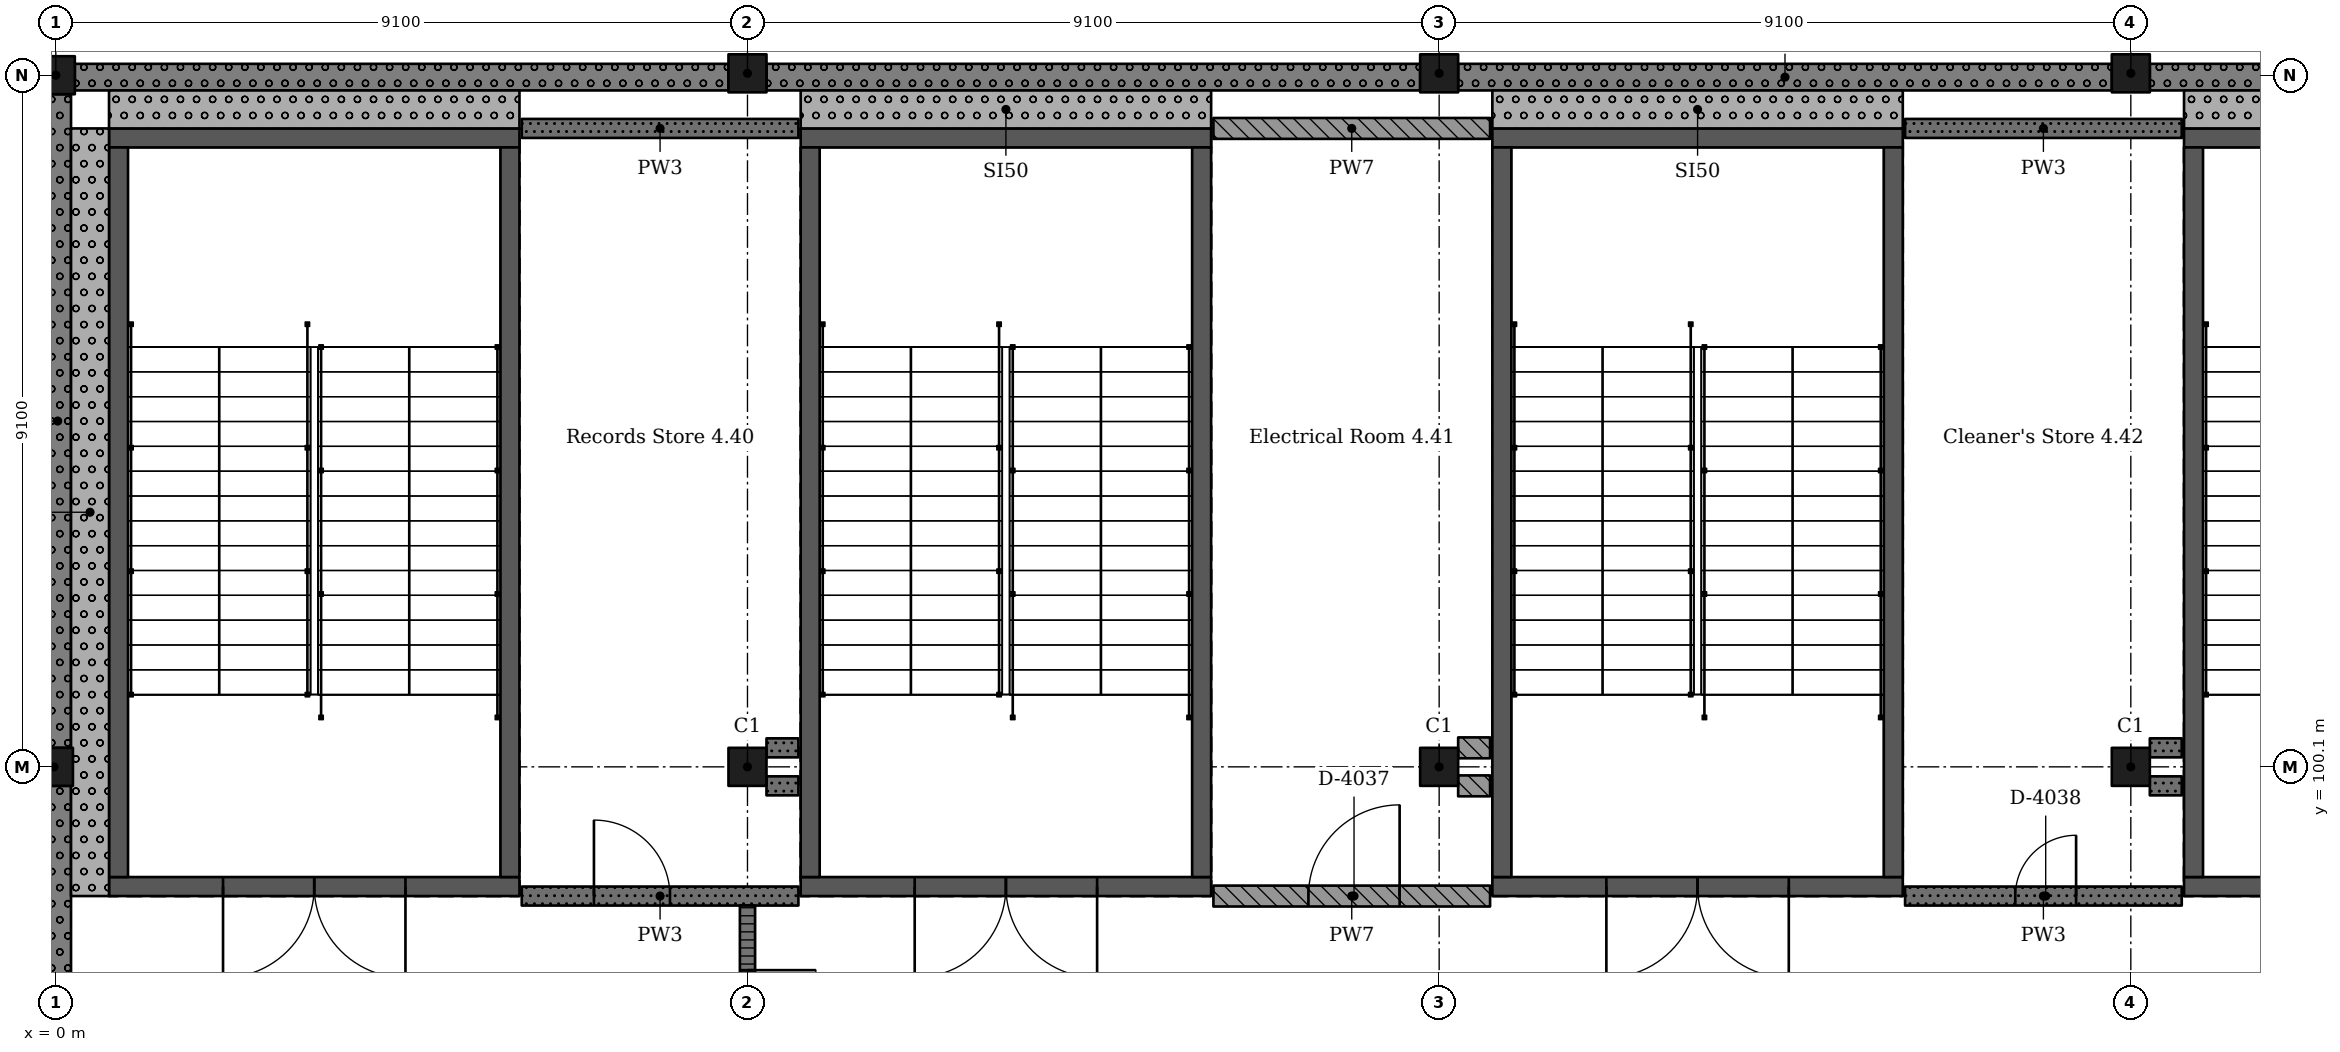
"""IFC4 building model, lengths in metres.
Left out: names, types, materials, properties, quantities, classifications, styles, units other than length and angle.
Written with IfcOpenShell. Run it as: python <this file> out.ifc"""

import sys

from ifc_helpers import new_model, si_unit, direction, frame, frame_2d, origin, origin_2d, place, context, subcontext, project, spatial, rectangle, extrude, element, fill, save


model = new_model("IFC4")
c1 = context("Model", 3, precision=1e-05, world=origin(), true_north=direction((0.0, 1.0)))
c2 = subcontext(c1, "Body", "Model", "MODEL_VIEW")
j1 = project(units=[si_unit("LENGTHUNIT", "METRE"), si_unit("PLANEANGLEUNIT", "RADIAN")], contexts=[c1])
p1 = place(None, origin())
s1 = spatial("IfcSite", under=j1, at=p1, CompositionType="ELEMENT")
p2 = place(p1, origin())
s2 = spatial("IfcBuilding", under=s1, at=p2, CompositionType="ELEMENT")
p3 = place(p2, frame((0.0, 0.0, 20.02)))
s3 = spatial("IfcBuildingStorey", under=s2, at=p3, CompositionType="ELEMENT", Elevation=20.02)
for number, where, z_axis, x_axis in (
    (1, (-0.025, 100.1, 0.0), (0.0, 0.0, 1.0), (1.0, 0.0, 0.0)),
    (2, (0.0, 109.2, 0.0), (0.0, 0.0, 1.0), (1.0, 0.0, 0.0)),
    (3, (9.1, 100.1, 0.0), (0.0, 0.0, 1.0), (1.0, 0.0, 0.0)),
    (4, (9.1, 109.225, 0.0), (0.0, 0.0, 1.0), (1.0, 0.0, 0.0)),
    (5, (18.2, 100.1, 0.0), (0.0, 0.0, 1.0), (1.0, 0.0, 0.0)),
    (6, (18.2, 109.225, 0.0), (0.0, 0.0, 1.0), (1.0, 0.0, 0.0)),
    (7, (27.3, 100.1, 0.0), (0.0, 0.0, 1.0), (1.0, 0.0, 0.0)),
    (8, (27.3, 109.225, 0.0), (0.0, 0.0, 1.0), (1.0, 0.0, 0.0)),
):
    element("IfcColumn", number, at=place(p3, frame(where, z_axis=z_axis, x_axis=x_axis)), inside=s3, PredefinedType="COLUMN", context=c2, shape_type="SweptSolid", body=[
        extrude(rectangle(XDim=0.5, YDim=0.5, at=origin_2d()), origin(), (0.0, 0.0, 1.0), 4.55),
    ])
p4 = place(p3, frame((6.1, 98.525, 0.0), z_axis=(0.0, 0.0, 1.0), x_axis=(-1.0, 0.0, 0.0)))
e9 = element("IfcWall", 9, at=p4, inside=s3, PredefinedType="SHEAR", context=c2, shape_type="SweptSolid", body=[
    extrude(rectangle(XDim=5.4, YDim=0.25, at=frame_2d((2.7, 0.0))), origin(), (0.0, 0.0, 1.0), 4.55),
])
p5 = place(p4, frame((1.5, 0.0, 0.0)))
e10 = element("IfcOpeningElement", 10, at=p5, cuts=e9, PredefinedType="OPENING", context=c2, shape_type="SweptSolid", body=[
    extrude(rectangle(XDim=2.4, YDim=2.1, at=frame_2d((1.2, 1.05))), frame((0.0, 0.135, 0.0), z_axis=(0.0, -1.0, 0.0), x_axis=(1.0, 0.0, 0.0)), (0.0, 0.0, 1.0), 0.27),
])
p6 = place(p3, frame((6.1, 108.375, 0.0), z_axis=(0.0, 0.0, 1.0), x_axis=(-1.0, 0.0, 0.0)))
e11 = element("IfcWall", 11, at=p6, inside=s3, PredefinedType="SHEAR", context=c2, shape_type="SweptSolid", body=[
    extrude(rectangle(XDim=5.4, YDim=0.25, at=frame_2d((2.7, 0.0))), origin(), (0.0, 0.0, 1.0), 4.55),
])
for number, where, z_axis, x_axis in (
    (12, (0.825, 108.25, 0.0), (0.0, 0.0, 1.0), (0.0, -1.0, 0.0)),
    (13, (5.975, 108.25, 0.0), (0.0, 0.0, 1.0), (0.0, -1.0, 0.0)),
):
    element("IfcWall", number, at=place(p3, frame(where, z_axis=z_axis, x_axis=x_axis)), inside=s3, PredefinedType="SHEAR", context=c2, shape_type="SweptSolid", body=[
        extrude(rectangle(XDim=9.6, YDim=0.25, at=frame_2d((4.8, 0.0))), origin(), (0.0, 0.0, 1.0), 4.55),
    ])
p7 = place(p3, frame((15.2, 98.525, 0.0), z_axis=(0.0, 0.0, 1.0), x_axis=(-1.0, 0.0, 0.0)))
e14 = element("IfcWall", 14, at=p7, inside=s3, PredefinedType="SHEAR", context=c2, shape_type="SweptSolid", body=[
    extrude(rectangle(XDim=5.4, YDim=0.25, at=frame_2d((2.7, 0.0))), origin(), (0.0, 0.0, 1.0), 4.55),
])
p8 = place(p7, frame((1.5, 0.0, 0.0)))
e15 = element("IfcOpeningElement", 15, at=p8, cuts=e14, PredefinedType="OPENING", context=c2, shape_type="SweptSolid", body=[
    extrude(rectangle(XDim=2.4, YDim=2.1, at=frame_2d((1.2, 1.05))), frame((0.0, 0.135, 0.0), z_axis=(0.0, -1.0, 0.0), x_axis=(1.0, 0.0, 0.0)), (0.0, 0.0, 1.0), 0.27),
])
p9 = place(p3, frame((15.2, 108.375, 0.0), z_axis=(0.0, 0.0, 1.0), x_axis=(-1.0, 0.0, 0.0)))
e16 = element("IfcWall", 16, at=p9, inside=s3, PredefinedType="SHEAR", context=c2, shape_type="SweptSolid", body=[
    extrude(rectangle(XDim=5.4, YDim=0.25, at=frame_2d((2.7, 0.0))), origin(), (0.0, 0.0, 1.0), 4.55),
])
for number, where, z_axis, x_axis in (
    (17, (9.925, 108.25, 0.0), (0.0, 0.0, 1.0), (0.0, -1.0, 0.0)),
    (18, (15.075, 108.25, 0.0), (0.0, 0.0, 1.0), (0.0, -1.0, 0.0)),
):
    element("IfcWall", number, at=place(p3, frame(where, z_axis=z_axis, x_axis=x_axis)), inside=s3, PredefinedType="SHEAR", context=c2, shape_type="SweptSolid", body=[
        extrude(rectangle(XDim=9.6, YDim=0.25, at=frame_2d((4.8, 0.0))), origin(), (0.0, 0.0, 1.0), 4.55),
    ])
p10 = place(p3, frame((24.3, 98.525, 0.0), z_axis=(0.0, 0.0, 1.0), x_axis=(-1.0, 0.0, 0.0)))
e19 = element("IfcWall", 19, at=p10, inside=s3, PredefinedType="SHEAR", context=c2, shape_type="SweptSolid", body=[
    extrude(rectangle(XDim=5.4, YDim=0.25, at=frame_2d((2.7, 0.0))), origin(), (0.0, 0.0, 1.0), 4.55),
])
p11 = place(p10, frame((1.5, 0.0, 0.0)))
e20 = element("IfcOpeningElement", 20, at=p11, cuts=e19, PredefinedType="OPENING", context=c2, shape_type="SweptSolid", body=[
    extrude(rectangle(XDim=2.4, YDim=2.1, at=frame_2d((1.2, 1.05))), frame((0.0, 0.135, 0.0), z_axis=(0.0, -1.0, 0.0), x_axis=(1.0, 0.0, 0.0)), (0.0, 0.0, 1.0), 0.27),
])
p12 = place(p3, frame((24.3, 108.375, 0.0), z_axis=(0.0, 0.0, 1.0), x_axis=(-1.0, 0.0, 0.0)))
e21 = element("IfcWall", 21, at=p12, inside=s3, PredefinedType="SHEAR", context=c2, shape_type="SweptSolid", body=[
    extrude(rectangle(XDim=5.4, YDim=0.25, at=frame_2d((2.7, 0.0))), origin(), (0.0, 0.0, 1.0), 4.55),
])
for number, where, z_axis, x_axis in (
    (22, (19.025, 108.25, 0.0), (0.0, 0.0, 1.0), (0.0, -1.0, 0.0)),
    (23, (24.175, 108.25, 0.0), (0.0, 0.0, 1.0), (0.0, -1.0, 0.0)),
):
    element("IfcWall", number, at=place(p3, frame(where, z_axis=z_axis, x_axis=x_axis)), inside=s3, PredefinedType="SHEAR", context=c2, shape_type="SweptSolid", body=[
        extrude(rectangle(XDim=9.6, YDim=0.25, at=frame_2d((4.8, 0.0))), origin(), (0.0, 0.0, 1.0), 4.55),
    ])
p13 = place(p3, frame((33.4, 98.525, 0.0), z_axis=(0.0, 0.0, 1.0), x_axis=(-1.0, 0.0, 0.0)))
e24 = element("IfcWall", 24, at=p13, inside=s3, PredefinedType="SHEAR", context=c2, shape_type="SweptSolid", body=[
    extrude(rectangle(XDim=5.4, YDim=0.25, at=frame_2d((2.7, 0.0))), origin(), (0.0, 0.0, 1.0), 4.55),
])
p14 = place(p13, frame((1.5, 0.0, 0.0)))
e25 = element("IfcOpeningElement", 25, at=p14, cuts=e24, PredefinedType="OPENING", context=c2, shape_type="SweptSolid", body=[
    extrude(rectangle(XDim=2.4, YDim=2.1, at=frame_2d((1.2, 1.05))), frame((0.0, 0.135, 0.0), z_axis=(0.0, -1.0, 0.0), x_axis=(1.0, 0.0, 0.0)), (0.0, 0.0, 1.0), 0.27),
])
p15 = place(p3, frame((33.4, 108.375, 0.0), z_axis=(0.0, 0.0, 1.0), x_axis=(-1.0, 0.0, 0.0)))
e26 = element("IfcWall", 26, at=p15, inside=s3, PredefinedType="SHEAR", context=c2, shape_type="SweptSolid", body=[
    extrude(rectangle(XDim=5.4, YDim=0.25, at=frame_2d((2.7, 0.0))), origin(), (0.0, 0.0, 1.0), 4.55),
])
p16 = place(p3, frame((28.125, 108.25, 0.0), z_axis=(0.0, 0.0, 1.0), x_axis=(0.0, -1.0, 0.0)))
e27 = element("IfcWall", 27, at=p16, inside=s3, PredefinedType="SHEAR", context=c2, shape_type="SweptSolid", body=[
    extrude(rectangle(XDim=9.6, YDim=0.25, at=frame_2d((4.8, 0.0))), origin(), (0.0, 0.0, 1.0), 4.55),
])
p17 = place(p3, frame((33.4, 109.175, 0.0), z_axis=(0.0, 0.0, 1.0), x_axis=(-1.0, 0.0, 0.0)))
e28 = element("IfcWall", 28, at=p17, inside=s3, PredefinedType="SOLIDWALL", context=c2, shape_type="SweptSolid", body=[
    extrude(rectangle(XDim=5.85, YDim=0.35, at=frame_2d((2.925, 0.0))), origin(), (0.0, 0.0, 1.0), 3.5),
])
p18 = place(p3, frame((27.05, 109.175, 0.0), z_axis=(0.0, 0.0, 1.0), x_axis=(-1.0, 0.0, 0.0)))
e29 = element("IfcWall", 29, at=p18, inside=s3, PredefinedType="SOLIDWALL", context=c2, shape_type="SweptSolid", body=[
    extrude(rectangle(XDim=8.6, YDim=0.35, at=frame_2d((4.3, 0.0))), origin(), (0.0, 0.0, 1.0), 3.5),
])
p19 = place(p3, frame((17.95, 109.175, 0.0), z_axis=(0.0, 0.0, 1.0), x_axis=(-1.0, 0.0, 0.0)))
e30 = element("IfcWall", 30, at=p19, inside=s3, PredefinedType="SOLIDWALL", context=c2, shape_type="SweptSolid", body=[
    extrude(rectangle(XDim=8.6, YDim=0.35, at=frame_2d((4.3, 0.0))), origin(), (0.0, 0.0, 1.0), 3.5),
])
p20 = place(p3, frame((8.85, 109.175, 0.0), z_axis=(0.0, 0.0, 1.0), x_axis=(-1.0, 0.0, 0.0)))
e31 = element("IfcWall", 31, at=p20, inside=s3, PredefinedType="SOLIDWALL", context=c2, shape_type="SweptSolid", body=[
    extrude(rectangle(XDim=8.6, YDim=0.35, at=frame_2d((4.3, 0.0))), origin(), (0.0, 0.0, 1.0), 3.5),
])
p21 = place(p3, frame((0.025, 108.95, 0.0), z_axis=(0.0, 0.0, 1.0), x_axis=(0.0, -1.0, 0.0)))
e32 = element("IfcWall", 32, at=p21, inside=s3, PredefinedType="SOLIDWALL", context=c2, shape_type="SweptSolid", body=[
    extrude(rectangle(XDim=8.6, YDim=0.35, at=frame_2d((4.3, 0.0))), origin(), (0.0, 0.0, 1.0), 3.5),
])
p22 = place(p3, frame((0.025, 99.85, 0.0), z_axis=(0.0, 0.0, 1.0), x_axis=(0.0, -1.0, 0.0)))
e33 = element("IfcWall", 33, at=p22, inside=s3, PredefinedType="SOLIDWALL", context=c2, shape_type="SweptSolid", body=[
    extrude(rectangle(XDim=8.6, YDim=0.35, at=frame_2d((4.3, 0.0))), origin(), (0.0, 0.0, 1.0), 3.5),
])
p23 = place(p3, frame((0.7, 108.75, 0.0), z_axis=(0.0, 0.0, 1.0), x_axis=(1.0, 0.0, 0.0)))
e34 = element("IfcWall", 34, at=p23, inside=s3, PredefinedType="SOLIDWALL", context=c2, shape_type="SweptSolid", body=[
    extrude(rectangle(XDim=5.4, YDim=0.5, at=frame_2d((2.7, 0.0))), origin(), (0.0, 0.0, 1.0), 4.25),
])
p24 = place(p3, frame((0.45, 98.4, 0.0), z_axis=(0.0, 0.0, 1.0), x_axis=(0.0, 1.0, 0.0)))
e35 = element("IfcWall", 35, at=p24, inside=s3, PredefinedType="SOLIDWALL", context=c2, shape_type="SweptSolid", body=[
    extrude(rectangle(XDim=10.1, YDim=0.5, at=frame_2d((5.05, 0.0))), origin(), (0.0, 0.0, 1.0), 4.25),
])
p25 = place(p3, frame((9.8, 108.75, 0.0), z_axis=(0.0, 0.0, 1.0), x_axis=(1.0, 0.0, 0.0)))
e36 = element("IfcWall", 36, at=p25, inside=s3, PredefinedType="SOLIDWALL", context=c2, shape_type="SweptSolid", body=[
    extrude(rectangle(XDim=5.4, YDim=0.5, at=frame_2d((2.7, 0.0))), origin(), (0.0, 0.0, 1.0), 4.25),
])
p26 = place(p3, frame((18.9, 108.75, 0.0), z_axis=(0.0, 0.0, 1.0), x_axis=(1.0, 0.0, 0.0)))
e37 = element("IfcWall", 37, at=p26, inside=s3, PredefinedType="SOLIDWALL", context=c2, shape_type="SweptSolid", body=[
    extrude(rectangle(XDim=5.4, YDim=0.5, at=frame_2d((2.7, 0.0))), origin(), (0.0, 0.0, 1.0), 4.25),
])
p27 = place(p3, frame((28.0, 108.75, 0.0), z_axis=(0.0, 0.0, 1.0), x_axis=(1.0, 0.0, 0.0)))
e38 = element("IfcWall", 38, at=p27, inside=s3, PredefinedType="SOLIDWALL", context=c2, shape_type="SweptSolid", body=[
    extrude(rectangle(XDim=5.4, YDim=0.5, at=frame_2d((2.7, 0.0))), origin(), (0.0, 0.0, 1.0), 4.25),
])
p28 = place(p3, frame((6.13, 98.4, 0.0), z_axis=(0.0, 0.0, 1.0), x_axis=(1.0, 0.0, 0.0)))
e39 = element("IfcWall", 39, at=p28, inside=s3, PredefinedType="SOLIDWALL", context=c2, shape_type="SweptSolid", body=[
    extrude(rectangle(XDim=3.64, YDim=0.25, at=frame_2d((1.82, 0.0))), origin(), (0.0, 0.0, 1.0), 4.25),
])
p29 = place(p28, frame((0.95, 0.0, 0.0)))
e40 = element("IfcOpeningElement", 40, at=p29, cuts=e39, PredefinedType="OPENING", context=c2, shape_type="SweptSolid", body=[
    extrude(rectangle(XDim=1.0, YDim=2.1, at=frame_2d((0.5, 1.05))), frame((0.0, 0.135, 0.0), z_axis=(0.0, -1.0, 0.0), x_axis=(1.0, 0.0, 0.0)), (0.0, 0.0, 1.0), 0.27),
])
p30 = place(p3, frame((6.13, 108.5, 0.0), z_axis=(0.0, 0.0, 1.0), x_axis=(1.0, 0.0, 0.0)))
e41 = element("IfcWall", 41, at=p30, inside=s3, PredefinedType="SOLIDWALL", context=c2, shape_type="SweptSolid", body=[
    extrude(rectangle(XDim=3.64, YDim=0.25, at=frame_2d((1.82, 0.0))), origin(), (0.0, 0.0, 1.0), 4.25),
])
p31 = place(p3, frame((9.1, 98.275, 0.0), z_axis=(0.0, 0.0, 1.0), x_axis=(0.0, -1.0, 0.0)))
e42 = element("IfcWall", 42, at=p31, inside=s3, PredefinedType="PARTITIONING", context=c2, shape_type="SweptSolid", body=[
    extrude(rectangle(XDim=6.975, YDim=0.2, at=frame_2d((3.487, 0.0))), origin(), (0.0, 0.0, 1.0), 3.5),
])
p32 = place(p31, frame((0.85, 0.0, 0.0)))
e43 = element("IfcOpeningElement", 43, at=p32, cuts=e42, PredefinedType="OPENING", context=c2, shape_type="SweptSolid", body=[
    extrude(rectangle(XDim=1.8, YDim=2.4, at=frame_2d((0.9, 1.2))), frame((0.0, 0.11, 0.0), z_axis=(0.0, -1.0, 0.0), x_axis=(1.0, 0.0, 0.0)), (0.0, 0.0, 1.0), 0.22),
])
p33 = place(p31, frame((4.35, 0.0, 0.0)))
e44 = element("IfcOpeningElement", 44, at=p33, cuts=e42, PredefinedType="OPENING", context=c2, shape_type="SweptSolid", body=[
    extrude(rectangle(XDim=1.8, YDim=2.4, at=frame_2d((0.9, 1.2))), frame((0.0, 0.11, 0.0), z_axis=(0.0, -1.0, 0.0), x_axis=(1.0, 0.0, 0.0)), (0.0, 0.0, 1.0), 0.22),
])
for number, where, z_axis, x_axis in (
    (45, (9.35, 99.85, 0.0), (0.0, 0.0, 1.0), (1.0, 0.0, 0.0)),
    (46, (9.77, 100.35, 0.0), (0.0, 0.0, 1.0), (-1.0, 0.0, 0.0)),
):
    element("IfcWall", number, at=place(p3, frame(where, z_axis=z_axis, x_axis=x_axis)), inside=s3, PredefinedType="SOLIDWALL", context=c2, shape_type="SweptSolid", body=[
        extrude(rectangle(XDim=0.42, YDim=0.25, at=frame_2d((0.21, 0.0))), origin(), (0.0, 0.0, 1.0), 4.25),
    ])
p34 = place(p3, frame((15.23, 98.4, 0.0), z_axis=(0.0, 0.0, 1.0), x_axis=(1.0, 0.0, 0.0)))
e47 = element("IfcWall", 47, at=p34, inside=s3, PredefinedType="SOLIDWALL", context=c2, shape_type="SweptSolid", body=[
    extrude(rectangle(XDim=3.64, YDim=0.275, at=frame_2d((1.82, 0.0))), origin(), (0.0, 0.0, 1.0), 4.25),
])
p35 = place(p34, frame((1.25, 0.0, 0.0)))
e48 = element("IfcOpeningElement", 48, at=p35, cuts=e47, PredefinedType="OPENING", context=c2, shape_type="SweptSolid", body=[
    extrude(rectangle(XDim=1.2, YDim=2.4, at=frame_2d((0.6, 1.2))), frame((0.0, 0.147, 0.0), z_axis=(0.0, -1.0, 0.0), x_axis=(1.0, 0.0, 0.0)), (0.0, 0.0, 1.0), 0.295),
])
p36 = place(p3, frame((15.23, 108.5, 0.0), z_axis=(0.0, 0.0, 1.0), x_axis=(1.0, 0.0, 0.0)))
e49 = element("IfcWall", 49, at=p36, inside=s3, PredefinedType="SOLIDWALL", context=c2, shape_type="SweptSolid", body=[
    extrude(rectangle(XDim=3.64, YDim=0.275, at=frame_2d((1.82, 0.0))), origin(), (0.0, 0.0, 1.0), 4.25),
])
for number, where, z_axis, x_axis in (
    (50, (18.45, 99.85, 0.0), (0.0, 0.0, 1.0), (1.0, 0.0, 0.0)),
    (51, (18.87, 100.35, 0.0), (0.0, 0.0, 1.0), (-1.0, 0.0, 0.0)),
):
    element("IfcWall", number, at=place(p3, frame(where, z_axis=z_axis, x_axis=x_axis)), inside=s3, PredefinedType="SOLIDWALL", context=c2, shape_type="SweptSolid", body=[
        extrude(rectangle(XDim=0.42, YDim=0.275, at=frame_2d((0.21, 0.0))), origin(), (0.0, 0.0, 1.0), 4.25),
    ])
p37 = place(p3, frame((24.33, 98.4, 0.0), z_axis=(0.0, 0.0, 1.0), x_axis=(1.0, 0.0, 0.0)))
e52 = element("IfcWall", 52, at=p37, inside=s3, PredefinedType="SOLIDWALL", context=c2, shape_type="SweptSolid", body=[
    extrude(rectangle(XDim=3.64, YDim=0.25, at=frame_2d((1.82, 0.0))), origin(), (0.0, 0.0, 1.0), 4.25),
])
p38 = place(p37, frame((1.45, 0.0, 0.0)))
e53 = element("IfcOpeningElement", 53, at=p38, cuts=e52, PredefinedType="OPENING", context=c2, shape_type="SweptSolid", body=[
    extrude(rectangle(XDim=0.8, YDim=2.1, at=frame_2d((0.4, 1.05))), frame((0.0, 0.135, 0.0), z_axis=(0.0, -1.0, 0.0), x_axis=(1.0, 0.0, 0.0)), (0.0, 0.0, 1.0), 0.27),
])
p39 = place(p3, frame((24.33, 108.5, 0.0), z_axis=(0.0, 0.0, 1.0), x_axis=(1.0, 0.0, 0.0)))
e54 = element("IfcWall", 54, at=p39, inside=s3, PredefinedType="SOLIDWALL", context=c2, shape_type="SweptSolid", body=[
    extrude(rectangle(XDim=3.64, YDim=0.25, at=frame_2d((1.82, 0.0))), origin(), (0.0, 0.0, 1.0), 4.25),
])
for number, where, z_axis, x_axis in (
    (55, (27.55, 99.85, 0.0), (0.0, 0.0, 1.0), (1.0, 0.0, 0.0)),
    (56, (27.97, 100.35, 0.0), (0.0, 0.0, 1.0), (-1.0, 0.0, 0.0)),
):
    element("IfcWall", number, at=place(p3, frame(where, z_axis=z_axis, x_axis=x_axis)), inside=s3, PredefinedType="SOLIDWALL", context=c2, shape_type="SweptSolid", body=[
        extrude(rectangle(XDim=0.42, YDim=0.25, at=frame_2d((0.21, 0.0))), origin(), (0.0, 0.0, 1.0), 4.25),
    ])
p40 = place(p29, origin())
e57 = element("IfcDoor", 57, at=p40, inside=s3, OperationType="SINGLE_SWING_RIGHT", PredefinedType="DOOR", context=c2, shape_type="SweptSolid", body=[
    extrude(rectangle(XDim=1.0, YDim=2.1, at=frame_2d((0.5, 1.05))), frame((0.0, 0.025, 0.0), z_axis=(0.0, -1.0, 0.0), x_axis=(1.0, 0.0, 0.0)), (0.0, 0.0, 1.0), 0.05),
])
fill(e40, e57)
p41 = place(p35, origin())
e58 = element("IfcDoor", 58, at=p41, inside=s3, OperationType="SINGLE_SWING_LEFT", PredefinedType="DOOR", context=c2, shape_type="SweptSolid", body=[
    extrude(rectangle(XDim=1.2, YDim=2.4, at=frame_2d((0.6, 1.2))), frame((0.0, 0.025, 0.0), z_axis=(0.0, -1.0, 0.0), x_axis=(1.0, 0.0, 0.0)), (0.0, 0.0, 1.0), 0.05),
])
fill(e48, e58)
p42 = place(p38, origin())
e59 = element("IfcDoor", 59, at=p42, inside=s3, OperationType="SINGLE_SWING_LEFT", PredefinedType="DOOR", context=c2, shape_type="SweptSolid", body=[
    extrude(rectangle(XDim=0.8, YDim=2.1, at=frame_2d((0.4, 1.05))), frame((0.0, 0.025, 0.0), z_axis=(0.0, -1.0, 0.0), x_axis=(1.0, 0.0, 0.0)), (0.0, 0.0, 1.0), 0.05),
])
fill(e53, e59)
p43 = place(p32, origin())
e60 = element("IfcDoor", 60, at=p43, inside=s3, OperationType="DOUBLE_DOOR_SINGLE_SWING", PredefinedType="DOOR", context=c2, shape_type="SweptSolid", body=[
    extrude(rectangle(XDim=1.8, YDim=2.4, at=frame_2d((0.9, 1.2))), frame((0.0, 0.025, 0.0), z_axis=(0.0, -1.0, 0.0), x_axis=(1.0, 0.0, 0.0)), (0.0, 0.0, 1.0), 0.05),
])
fill(e43, e60)
p44 = place(p5, origin())
e61 = element("IfcDoor", 61, at=p44, inside=s3, OperationType="DOUBLE_DOOR_SINGLE_SWING", PredefinedType="DOOR", context=c2, shape_type="SweptSolid", body=[
    extrude(rectangle(XDim=2.4, YDim=2.1, at=frame_2d((1.2, 1.05))), frame((0.0, 0.025, 0.0), z_axis=(0.0, -1.0, 0.0), x_axis=(1.0, 0.0, 0.0)), (0.0, 0.0, 1.0), 0.05),
])
fill(e10, e61)
p45 = place(p8, origin())
e62 = element("IfcDoor", 62, at=p45, inside=s3, OperationType="DOUBLE_DOOR_SINGLE_SWING", PredefinedType="DOOR", context=c2, shape_type="SweptSolid", body=[
    extrude(rectangle(XDim=2.4, YDim=2.1, at=frame_2d((1.2, 1.05))), frame((0.0, 0.025, 0.0), z_axis=(0.0, -1.0, 0.0), x_axis=(1.0, 0.0, 0.0)), (0.0, 0.0, 1.0), 0.05),
])
fill(e15, e62)
p46 = place(p11, origin())
e63 = element("IfcDoor", 63, at=p46, inside=s3, OperationType="DOUBLE_DOOR_SINGLE_SWING", PredefinedType="DOOR", context=c2, shape_type="SweptSolid", body=[
    extrude(rectangle(XDim=2.4, YDim=2.1, at=frame_2d((1.2, 1.05))), frame((0.0, 0.025, 0.0), z_axis=(0.0, -1.0, 0.0), x_axis=(1.0, 0.0, 0.0)), (0.0, 0.0, 1.0), 0.05),
])
fill(e20, e63)
save(model, sys.argv[1])
